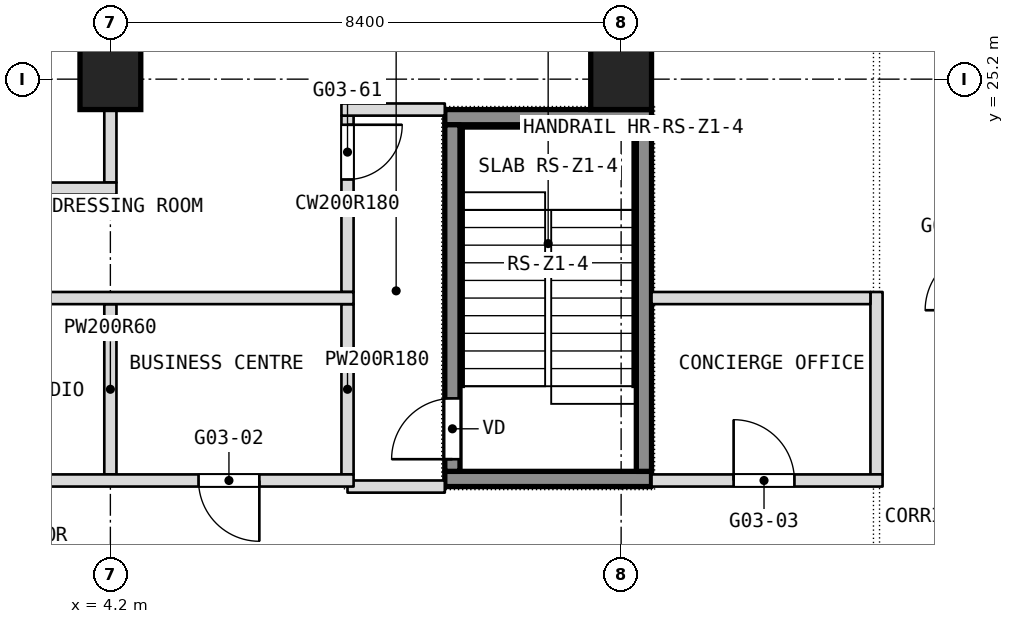
"""IFC4 building model, lengths in metres.
Left out: names, types, materials, properties, quantities, classifications, styles, units other than length and angle.
Written with IfcOpenShell. Run it as: python <this file> out.ifc"""

import sys

from ifc_helpers import new_model, si_unit, direction, frame, frame_2d, origin, origin_2d, place, context, subcontext, project, spatial, rectangle, extrude, element, fill, save


model = new_model("IFC4")
c1 = context("Model", 3, precision=1e-05, world=origin(), true_north=direction((0.0, 1.0)))
c2 = subcontext(c1, "Body", "Model", "MODEL_VIEW")
j1 = project(units=[si_unit("LENGTHUNIT", "METRE"), si_unit("PLANEANGLEUNIT", "RADIAN")], contexts=[c1])
p1 = place(None, origin())
s1 = spatial("IfcSite", under=j1, at=p1, CompositionType="ELEMENT")
p2 = place(p1, origin())
s2 = spatial("IfcBuilding", under=s1, at=p2, CompositionType="ELEMENT")
p3 = place(p2, frame((0.0, 0.0, 50.9)))
s3 = spatial("IfcBuildingStorey", under=s2, at=p3, CompositionType="ELEMENT", Elevation=50.9)
for number, where, z_axis, x_axis in (
    (1, (4.2, 25.2, 0.0), (0.0, 0.0, 1.0), (1.0, 0.0, 0.0)),
    (2, (12.6, 25.2, 0.0), (0.0, 0.0, 1.0), (1.0, 0.0, 0.0)),
):
    element("IfcColumn", number, at=place(p3, frame(where, z_axis=z_axis, x_axis=x_axis)), inside=s3, PredefinedType="COLUMN", context=c2, shape_type="SweptSolid", body=[
        extrude(rectangle(XDim=1.0, YDim=1.0, at=origin_2d()), origin(), (0.0, 0.0, 1.0), 3.6),
    ])
p4 = place(p3, frame((16.8, 18.7, 0.0), z_axis=(0.0, 0.0, 1.0), x_axis=(0.0, 1.0, 0.0)))
e3 = element("IfcWall", 3, at=p4, inside=s3, PredefinedType="PARTITIONING", context=c2, shape_type="SweptSolid", body=[
    extrude(rectangle(XDim=3.0, YDim=0.2, at=frame_2d((1.5, 0.0))), origin(), (0.0, 0.0, 1.0), 3.34),
])
p5 = place(p3, frame((8.1, 18.7, 0.0), z_axis=(0.0, 0.0, 1.0), x_axis=(0.0, 1.0, 0.0)))
e4 = element("IfcWall", 4, at=p5, inside=s3, PredefinedType="PARTITIONING", context=c2, shape_type="SweptSolid", body=[
    extrude(rectangle(XDim=2.8, YDim=0.2, at=frame_2d((1.4, 0.0))), origin(), (0.0, 0.0, 1.0), 3.34),
])
p6 = place(p3, frame((8.1, 21.7, 0.0), z_axis=(0.0, 0.0, 1.0), x_axis=(0.0, 1.0, 0.0)))
e5 = element("IfcWall", 5, at=p6, inside=s3, PredefinedType="PARTITIONING", context=c2, shape_type="SweptSolid", body=[
    extrude(rectangle(XDim=2.9, YDim=0.2, at=frame_2d((1.45, 0.0))), origin(), (0.0, 0.0, 1.0), 3.34),
])
p7 = place(p6, frame((1.85, 0.0, 0.0)))
e6 = element("IfcOpeningElement", 6, at=p7, cuts=e5, PredefinedType="OPENING", context=c2, shape_type="SweptSolid", body=[
    extrude(rectangle(XDim=0.9, YDim=2.1, at=frame_2d((0.45, 1.05))), frame((0.0, 0.1, 0.0), z_axis=(0.0, -1.0, 0.0), x_axis=(1.0, 0.0, 0.0)), (0.0, 0.0, 1.0), 0.2),
])
p8 = place(p3, frame((4.2, 18.7, 0.0), z_axis=(0.0, 0.0, 1.0), x_axis=(0.0, 1.0, 0.0)))
e7 = element("IfcWall", 7, at=p8, inside=s3, PredefinedType="PARTITIONING", context=c2, shape_type="SweptSolid", body=[
    extrude(rectangle(XDim=2.8, YDim=0.2, at=frame_2d((1.4, 0.0))), origin(), (0.0, 0.0, 1.0), 3.34),
])
p9 = place(p3, frame((4.2, 23.5, 0.0), z_axis=(0.0, 0.0, 1.0), x_axis=(0.0, 1.0, 0.0)))
e8 = element("IfcWall", 8, at=p9, inside=s3, PredefinedType="PARTITIONING", context=c2, shape_type="SweptSolid", body=[
    extrude(rectangle(XDim=10.04, YDim=0.2, at=frame_2d((5.02, 0.0))), origin(), (0.0, 0.0, 1.0), 3.34),
])
p10 = place(p3, frame((8.1, 18.5, 0.0), z_axis=(0.0, 0.0, 1.0), x_axis=(1.0, 0.0, 0.0)))
e9 = element("IfcWall", 9, at=p10, inside=s3, PredefinedType="PARTITIONING", context=c2, shape_type="SweptSolid", body=[
    extrude(rectangle(XDim=1.6, YDim=0.2, at=frame_2d((0.8, 0.0))), origin(), (0.0, 0.0, 1.0), 3.34),
])
p11 = place(p3, frame((-16.9, 18.6, 0.0), z_axis=(0.0, 0.0, 1.0), x_axis=(1.0, 0.0, 0.0)))
e10 = element("IfcWall", 10, at=p11, inside=s3, PredefinedType="PARTITIONING", context=c2, shape_type="SweptSolid", body=[
    extrude(rectangle(XDim=25.1, YDim=0.2, at=frame_2d((12.55, 0.0))), origin(), (0.0, 0.0, 1.0), 3.34),
])
p12 = place(p11, frame((16.0, 0.0, 0.0)))
e11 = element("IfcOpeningElement", 11, at=p12, cuts=e10, PredefinedType="OPENING", context=c2, shape_type="SweptSolid", body=[
    extrude(rectangle(XDim=1.8, YDim=2.1, at=frame_2d((0.9, 1.05))), frame((0.0, 0.1, 0.0), z_axis=(0.0, -1.0, 0.0), x_axis=(1.0, 0.0, 0.0)), (0.0, 0.0, 1.0), 0.2),
])
p13 = place(p11, frame((22.55, 0.0, 0.0)))
e12 = element("IfcOpeningElement", 12, at=p13, cuts=e10, PredefinedType="OPENING", context=c2, shape_type="SweptSolid", body=[
    extrude(rectangle(XDim=1.0, YDim=2.1, at=frame_2d((0.5, 1.05))), frame((0.0, 0.1, 0.0), z_axis=(0.0, -1.0, 0.0), x_axis=(1.0, 0.0, 0.0)), (0.0, 0.0, 1.0), 0.2),
])
p14 = place(p11, frame((5.9, 0.0, 0.0)))
e13 = element("IfcOpeningElement", 13, at=p14, cuts=e10, PredefinedType="OPENING", context=c2, shape_type="SweptSolid", body=[
    extrude(rectangle(XDim=1.0, YDim=2.1, at=frame_2d((0.5, 1.05))), frame((0.0, 0.1, 0.0), z_axis=(0.0, -1.0, 0.0), x_axis=(1.0, 0.0, 0.0)), (0.0, 0.0, 1.0), 0.2),
])
p15 = place(p11, frame((10.1, 0.0, 0.0)))
e14 = element("IfcOpeningElement", 14, at=p15, cuts=e10, PredefinedType="OPENING", context=c2, shape_type="SweptSolid", body=[
    extrude(rectangle(XDim=1.0, YDim=2.1, at=frame_2d((0.5, 1.05))), frame((0.0, 0.1, 0.0), z_axis=(0.0, -1.0, 0.0), x_axis=(1.0, 0.0, 0.0)), (0.0, 0.0, 1.0), 0.2),
])
p16 = place(p11, frame((1.7, 0.0, 0.0)))
e15 = element("IfcOpeningElement", 15, at=p16, cuts=e10, PredefinedType="OPENING", context=c2, shape_type="SweptSolid", body=[
    extrude(rectangle(XDim=1.0, YDim=2.1, at=frame_2d((0.5, 1.05))), frame((0.0, 0.1, 0.0), z_axis=(0.0, -1.0, 0.0), x_axis=(1.0, 0.0, 0.0)), (0.0, 0.0, 1.0), 0.2),
])
p17 = place(p3, frame((13.1, 18.6, 0.0), z_axis=(0.0, 0.0, 1.0), x_axis=(1.0, 0.0, 0.0)))
e16 = element("IfcWall", 16, at=p17, inside=s3, PredefinedType="PARTITIONING", context=c2, shape_type="SweptSolid", body=[
    extrude(rectangle(XDim=3.8, YDim=0.2, at=frame_2d((1.9, 0.0))), origin(), (0.0, 0.0, 1.0), 3.34),
])
p18 = place(p17, frame((1.35, 0.0, 0.0)))
e17 = element("IfcOpeningElement", 17, at=p18, cuts=e16, PredefinedType="OPENING", context=c2, shape_type="SweptSolid", body=[
    extrude(rectangle(XDim=1.0, YDim=2.1, at=frame_2d((0.5, 1.05))), frame((0.0, 0.1, 0.0), z_axis=(0.0, -1.0, 0.0), x_axis=(1.0, 0.0, 0.0)), (0.0, 0.0, 1.0), 0.2),
])
p19 = place(p3, frame((-16.7, 21.6, 0.0), z_axis=(0.0, 0.0, 1.0), x_axis=(1.0, 0.0, 0.0)))
e18 = element("IfcWall", 18, at=p19, inside=s3, PredefinedType="PARTITIONING", context=c2, shape_type="SweptSolid", body=[
    extrude(rectangle(XDim=24.9, YDim=0.2, at=frame_2d((12.45, 0.0))), origin(), (0.0, 0.0, 1.0), 3.34),
])
p20 = place(p19, frame((1.6, 0.0, 0.0)))
e19 = element("IfcOpeningElement", 19, at=p20, cuts=e18, PredefinedType="OPENING", context=c2, shape_type="SweptSolid", body=[
    extrude(rectangle(XDim=1.0, YDim=2.1, at=frame_2d((0.5, 1.05))), frame((0.0, 0.1, 0.0), z_axis=(0.0, -1.0, 0.0), x_axis=(1.0, 0.0, 0.0)), (0.0, 0.0, 1.0), 0.2),
])
p21 = place(p3, frame((13.1, 21.6, 0.0), z_axis=(0.0, 0.0, 1.0), x_axis=(1.0, 0.0, 0.0)))
e20 = element("IfcWall", 20, at=p21, inside=s3, PredefinedType="PARTITIONING", context=c2, shape_type="SweptSolid", body=[
    extrude(rectangle(XDim=3.6, YDim=0.2, at=frame_2d((1.8, 0.0))), origin(), (0.0, 0.0, 1.0), 3.34),
])
p22 = place(p3, frame((-16.7, 23.4, 0.0), z_axis=(0.0, 0.0, 1.0), x_axis=(1.0, 0.0, 0.0)))
e21 = element("IfcWall", 21, at=p22, inside=s3, PredefinedType="PARTITIONING", context=c2, shape_type="SweptSolid", body=[
    extrude(rectangle(XDim=21.0, YDim=0.2, at=frame_2d((10.5, 0.0))), origin(), (0.0, 0.0, 1.0), 3.34),
])
p23 = place(p22, frame((2.4, 0.0, 0.0)))
e22 = element("IfcOpeningElement", 22, at=p23, cuts=e21, PredefinedType="OPENING", context=c2, shape_type="SweptSolid", body=[
    extrude(rectangle(XDim=0.9, YDim=2.1, at=frame_2d((0.45, 1.05))), frame((0.0, 0.1, 0.0), z_axis=(0.0, -1.0, 0.0), x_axis=(1.0, 0.0, 0.0)), (0.0, 0.0, 1.0), 0.2),
])
p24 = place(p22, frame((7.7, 0.0, 0.0)))
e23 = element("IfcOpeningElement", 23, at=p24, cuts=e21, PredefinedType="OPENING", context=c2, shape_type="SweptSolid", body=[
    extrude(rectangle(XDim=1.1, YDim=2.1, at=frame_2d((0.55, 1.05))), frame((0.0, 0.1, 0.0), z_axis=(0.0, -1.0, 0.0), x_axis=(1.0, 0.0, 0.0)), (0.0, 0.0, 1.0), 0.2),
])
p25 = place(p22, frame((16.2, 0.0, 0.0)))
e24 = element("IfcOpeningElement", 24, at=p25, cuts=e21, PredefinedType="OPENING", context=c2, shape_type="SweptSolid", body=[
    extrude(rectangle(XDim=1.1, YDim=2.1, at=frame_2d((0.55, 1.05))), frame((0.0, 0.1, 0.0), z_axis=(0.0, -1.0, 0.0), x_axis=(1.0, 0.0, 0.0)), (0.0, 0.0, 1.0), 0.2),
])
p26 = place(p3, frame((8.0, 24.7, 0.0), z_axis=(0.0, 0.0, 1.0), x_axis=(1.0, 0.0, 0.0)))
e25 = element("IfcWall", 25, at=p26, inside=s3, PredefinedType="PARTITIONING", context=c2, shape_type="SweptSolid", body=[
    extrude(rectangle(XDim=1.7, YDim=0.2, at=frame_2d((0.85, 0.0))), origin(), (0.0, 0.0, 1.0), 3.34),
])
for number, where, z_axis, x_axis in (
    (26, (9.7, 18.625, 0.1), (0.0, 0.0, 1.0), (1.0, 0.0, 0.0)),
    (27, (9.7, 24.575, 0.1), (0.0, 0.0, 1.0), (1.0, 0.0, 0.0)),
):
    element("IfcWall", number, at=place(p3, frame(where, z_axis=z_axis, x_axis=x_axis)), inside=s3, PredefinedType="SHEAR", context=c2, shape_type="SweptSolid", body=[
        extrude(rectangle(XDim=3.4, YDim=0.25, at=frame_2d((1.7, 0.0))), origin(), (0.0, 0.0, 1.0), 3.6),
    ])
p27 = place(p3, frame((9.825, 18.75, 0.1), z_axis=(0.0, 0.0, 1.0), x_axis=(0.0, 1.0, 0.0)))
e28 = element("IfcWall", 28, at=p27, inside=s3, PredefinedType="SHEAR", context=c2, shape_type="SweptSolid", body=[
    extrude(rectangle(XDim=5.7, YDim=0.25, at=frame_2d((2.85, 0.0))), origin(), (0.0, 0.0, 1.0), 3.6),
])
p28 = place(p27, frame((0.2, 0.0, 0.0)))
e29 = element("IfcOpeningElement", 29, at=p28, cuts=e28, PredefinedType="OPENING", context=c2, shape_type="SweptSolid", body=[
    extrude(rectangle(XDim=1.0, YDim=2.1, at=frame_2d((0.5, 1.05))), frame((0.0, 0.125, 0.0), z_axis=(0.0, -1.0, 0.0), x_axis=(1.0, 0.0, 0.0)), (0.0, 0.0, 1.0), 0.25),
])
p29 = place(p3, frame((12.975, 18.75, 0.1), z_axis=(0.0, 0.0, 1.0), x_axis=(0.0, 1.0, 0.0)))
e30 = element("IfcWall", 30, at=p29, inside=s3, PredefinedType="SHEAR", context=c2, shape_type="SweptSolid", body=[
    extrude(rectangle(XDim=5.7, YDim=0.25, at=frame_2d((2.85, 0.0))), origin(), (0.0, 0.0, 1.0), 3.6),
])
p30 = place(p7, origin())
e31 = element("IfcDoor", 31, at=p30, inside=s3, OperationType="SINGLE_SWING_LEFT", PredefinedType="DOOR", context=c2, shape_type="SweptSolid", body=[
    extrude(rectangle(XDim=0.9, YDim=2.1, at=frame_2d((0.45, 1.05))), frame((0.0, 0.025, 0.0), z_axis=(0.0, -1.0, 0.0), x_axis=(1.0, 0.0, 0.0)), (0.0, 0.0, 1.0), 0.05),
])
fill(e6, e31)
p31 = place(p13, origin())
e32 = element("IfcDoor", 32, at=p31, inside=s3, OperationType="SINGLE_SWING_RIGHT", PredefinedType="DOOR", context=c2, shape_type="SweptSolid", body=[
    extrude(rectangle(XDim=1.0, YDim=2.1, at=frame_2d((0.5, 1.05))), frame((0.0, 0.025, 0.0), z_axis=(0.0, -1.0, 0.0), x_axis=(1.0, 0.0, 0.0)), (0.0, 0.0, 1.0), 0.05),
])
fill(e12, e32)
p32 = place(p18, origin())
e33 = element("IfcDoor", 33, at=p32, inside=s3, OperationType="SINGLE_SWING_LEFT", PredefinedType="DOOR", context=c2, shape_type="SweptSolid", body=[
    extrude(rectangle(XDim=1.0, YDim=2.1, at=frame_2d((0.5, 1.05))), frame((0.0, 0.025, 0.0), z_axis=(0.0, -1.0, 0.0), x_axis=(1.0, 0.0, 0.0)), (0.0, 0.0, 1.0), 0.05),
])
fill(e17, e33)
p33 = place(p28, origin())
e34 = element("IfcDoor", 34, at=p33, inside=s3, OperationType="SINGLE_SWING_LEFT", PredefinedType="DOOR", context=c2, shape_type="SweptSolid", body=[
    extrude(rectangle(XDim=1.0, YDim=2.1, at=frame_2d((0.5, 1.05))), frame((0.0, 0.025, 0.0), z_axis=(0.0, -1.0, 0.0), x_axis=(1.0, 0.0, 0.0)), (0.0, 0.0, 1.0), 0.05),
])
fill(e29, e34)
save(model, sys.argv[1])
